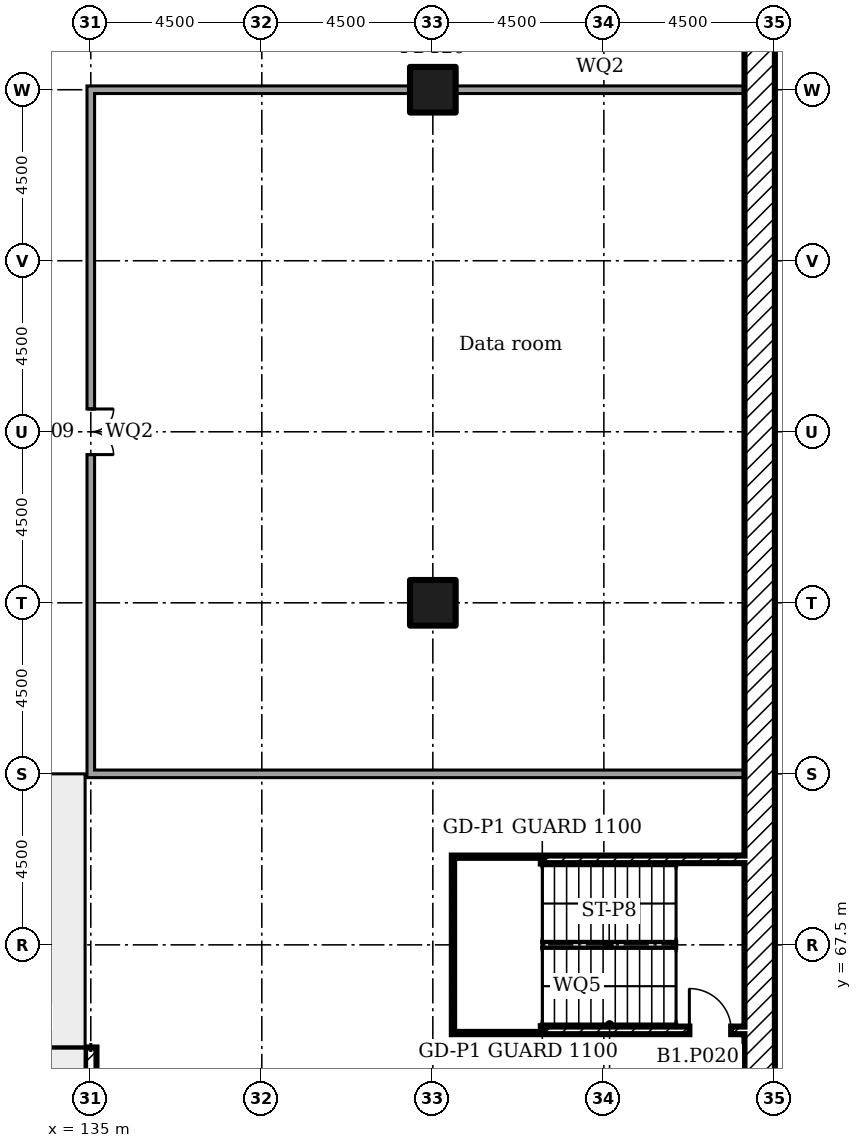
"""IFC4 building model, lengths in metres.
Left out: names, types, materials, properties, quantities, classifications, styles, units other than length and angle.
Written with IfcOpenShell. Run it as: python <this file> out.ifc"""

import sys

from ifc_helpers import new_model, si_unit, direction, frame, frame_2d, origin, origin_2d, place, context, subcontext, project, spatial, rectangle, extrude, element, fill, save


model = new_model("IFC4")
c1 = context("Model", 3, precision=1e-05, world=origin(), true_north=direction((0.0, 1.0)))
c2 = subcontext(c1, "Body", "Model", "MODEL_VIEW")
j1 = project(units=[si_unit("LENGTHUNIT", "METRE"), si_unit("PLANEANGLEUNIT", "RADIAN")], contexts=[c1])
p1 = place(None, origin())
s1 = spatial("IfcSite", under=j1, at=p1, CompositionType="ELEMENT")
p2 = place(p1, origin())
s2 = spatial("IfcBuilding", under=s1, at=p2, CompositionType="ELEMENT")
p3 = place(p2, frame((0.0, 0.0, -4.0)))
s3 = spatial("IfcBuildingStorey", under=s2, at=p3, CompositionType="ELEMENT", Elevation=-4.0)
for number, where in (
    (1, (144.0, 76.5, 0.0)),
    (2, (144.0, 90.0, 0.0)),
):
    element("IfcColumn", number, at=place(p3, frame(where)), inside=s3, PredefinedType="COLUMN", context=c2, shape_type="SweptSolid", body=[
        extrude(rectangle(XDim=1.2, YDim=1.2, at=origin_2d()), origin(), (0.0, 0.0, 1.0), 4.0),
    ])
p4 = place(p3, frame((152.6, 0.8, 0.0), z_axis=(0.0, 0.0, 1.0), x_axis=(0.0, 1.0, 0.0)))
e3 = element("IfcWall", 3, at=p4, inside=s3, PredefinedType="SOLIDWALL", context=c2, shape_type="SweptSolid", body=[
    extrude(rectangle(XDim=97.4, YDim=0.8, at=frame_2d((48.7, 0.0))), origin(), (0.0, 0.0, 1.0), 4.0),
])
p5 = place(p3, frame((135.0, 71.9, 0.0), z_axis=(0.0, 0.0, 1.0), x_axis=(0.0, 1.0, 0.0)))
e4 = element("IfcWall", 4, at=p5, inside=s3, PredefinedType="SOLIDWALL", context=c2, shape_type="SweptSolid", body=[
    extrude(rectangle(XDim=18.2, YDim=0.2, at=frame_2d((9.1, 0.0))), origin(), (0.0, 0.0, 1.0), 3.55),
])
p6 = place(p5, frame((8.5, 0.0, 0.0)))
e5 = element("IfcOpeningElement", 5, at=p6, cuts=e4, PredefinedType="OPENING", context=c2, shape_type="SweptSolid", body=[
    extrude(rectangle(XDim=1.2, YDim=2.1, at=frame_2d((0.6, 1.05))), frame((0.0, 0.11, 0.0), z_axis=(0.0, -1.0, 0.0), x_axis=(1.0, 0.0, 0.0)), (0.0, 0.0, 1.0), 0.22),
])
p7 = place(p3, frame((135.1, 72.0, 0.0)))
e6 = element("IfcWall", 6, at=p7, inside=s3, PredefinedType="SOLIDWALL", context=c2, shape_type="SweptSolid", body=[
    extrude(rectangle(XDim=17.1, YDim=0.2, at=frame_2d((8.55, 0.0))), origin(), (0.0, 0.0, 1.0), 3.55),
])
p8 = place(p3, frame((135.1, 90.0, 0.0)))
e7 = element("IfcWall", 7, at=p8, inside=s3, PredefinedType="SOLIDWALL", context=c2, shape_type="SweptSolid", body=[
    extrude(rectangle(XDim=8.305, YDim=0.2, at=frame_2d((4.152, 0.0))), origin(), (0.0, 0.0, 1.0), 3.55),
])
p9 = place(p3, frame((144.595, 90.0, 0.0)))
e8 = element("IfcWall", 8, at=p9, inside=s3, PredefinedType="SOLIDWALL", context=c2, shape_type="SweptSolid", body=[
    extrude(rectangle(XDim=7.605, YDim=0.2, at=frame_2d((3.802, 0.0))), origin(), (0.0, 0.0, 1.0), 3.55),
])
p10 = place(p3, frame((144.6, 65.15, 0.0), z_axis=(0.0, 0.0, 1.0), x_axis=(0.0, 1.0, 0.0)))
e9 = element("IfcWall", 9, at=p10, inside=s3, PredefinedType="SOLIDWALL", context=c2, shape_type="SweptSolid", body=[
    extrude(rectangle(XDim=4.7, YDim=0.2, at=frame_2d((2.35, 0.0))), origin(), (0.0, 0.0, 1.0), 3.55),
])
p11 = place(p3, frame((144.7, 65.25, 0.0)))
e10 = element("IfcWall", 10, at=p11, inside=s3, PredefinedType="SOLIDWALL", context=c2, shape_type="SweptSolid", body=[
    extrude(rectangle(XDim=7.5, YDim=0.2, at=frame_2d((3.75, 0.0))), origin(), (0.0, 0.0, 1.0), 3.55),
])
p12 = place(p11, frame((6.05, 0.0, 0.0)))
e11 = element("IfcOpeningElement", 11, at=p12, cuts=e10, PredefinedType="OPENING", context=c2, shape_type="SweptSolid", body=[
    extrude(rectangle(XDim=1.1, YDim=2.1, at=frame_2d((0.55, 1.05))), frame((0.0, 0.11, 0.0), z_axis=(0.0, -1.0, 0.0), x_axis=(1.0, 0.0, 0.0)), (0.0, 0.0, 1.0), 0.22),
])
p13 = place(p3, frame((144.7, 69.75, 0.0)))
e12 = element("IfcWall", 12, at=p13, inside=s3, PredefinedType="SOLIDWALL", context=c2, shape_type="SweptSolid", body=[
    extrude(rectangle(XDim=7.5, YDim=0.2, at=frame_2d((3.75, 0.0))), origin(), (0.0, 0.0, 1.0), 3.55),
])
for number, where, z_axis, x_axis in (
    (13, (146.78, 65.35, -2.0), (0.0, 0.0, 1.0), (0.0, 1.0, 0.0)),
    (14, (145.3, 65.35, -2.0), (0.0, 0.0, 1.0), (0.0, 1.0, 0.0)),
):
    element("IfcWall", number, at=place(p3, frame(where, z_axis=z_axis, x_axis=x_axis)), inside=s3, PredefinedType="SOLIDWALL", context=c2, shape_type="SweptSolid", body=[
        extrude(rectangle(XDim=4.3, YDim=0.2, at=frame_2d((2.15, 0.0))), origin(), (0.0, 0.0, 1.0), 3.8),
    ])
p14 = place(p3, frame((135.0, 45.0, 0.0), z_axis=(0.0, 0.0, 1.0), x_axis=(0.0, 1.0, 0.0)))
e15 = element("IfcWall", 15, at=p14, inside=s3, PredefinedType="SOLIDWALL", context=c2, shape_type="SweptSolid", body=[
    extrude(rectangle(XDim=19.8, YDim=0.3, at=frame_2d((9.9, 0.0))), origin(), (0.0, 0.0, 1.0), 1.1),
])
p15 = place(p6, frame((1.2, 0.0, 0.0), x_axis=(-1.0, 0.0, 0.0)))
e16 = element("IfcDoor", 16, at=p15, inside=s3, OperationType="DOUBLE_DOOR_SINGLE_SWING", PredefinedType="DOOR", context=c2, shape_type="SweptSolid", body=[
    extrude(rectangle(XDim=1.2, YDim=2.1, at=frame_2d((0.6, 1.05))), frame((0.0, 0.025, 0.0), z_axis=(0.0, -1.0, 0.0), x_axis=(1.0, 0.0, 0.0)), (0.0, 0.0, 1.0), 0.05),
])
fill(e5, e16)
p16 = place(p12, origin())
e17 = element("IfcDoor", 17, at=p16, inside=s3, OperationType="SINGLE_SWING_RIGHT", PredefinedType="DOOR", context=c2, shape_type="SweptSolid", body=[
    extrude(rectangle(XDim=1.1, YDim=2.1, at=frame_2d((0.55, 1.05))), frame((0.0, 0.025, 0.0), z_axis=(0.0, -1.0, 0.0), x_axis=(1.0, 0.0, 0.0)), (0.0, 0.0, 1.0), 0.05),
])
fill(e11, e17)
save(model, sys.argv[1])
